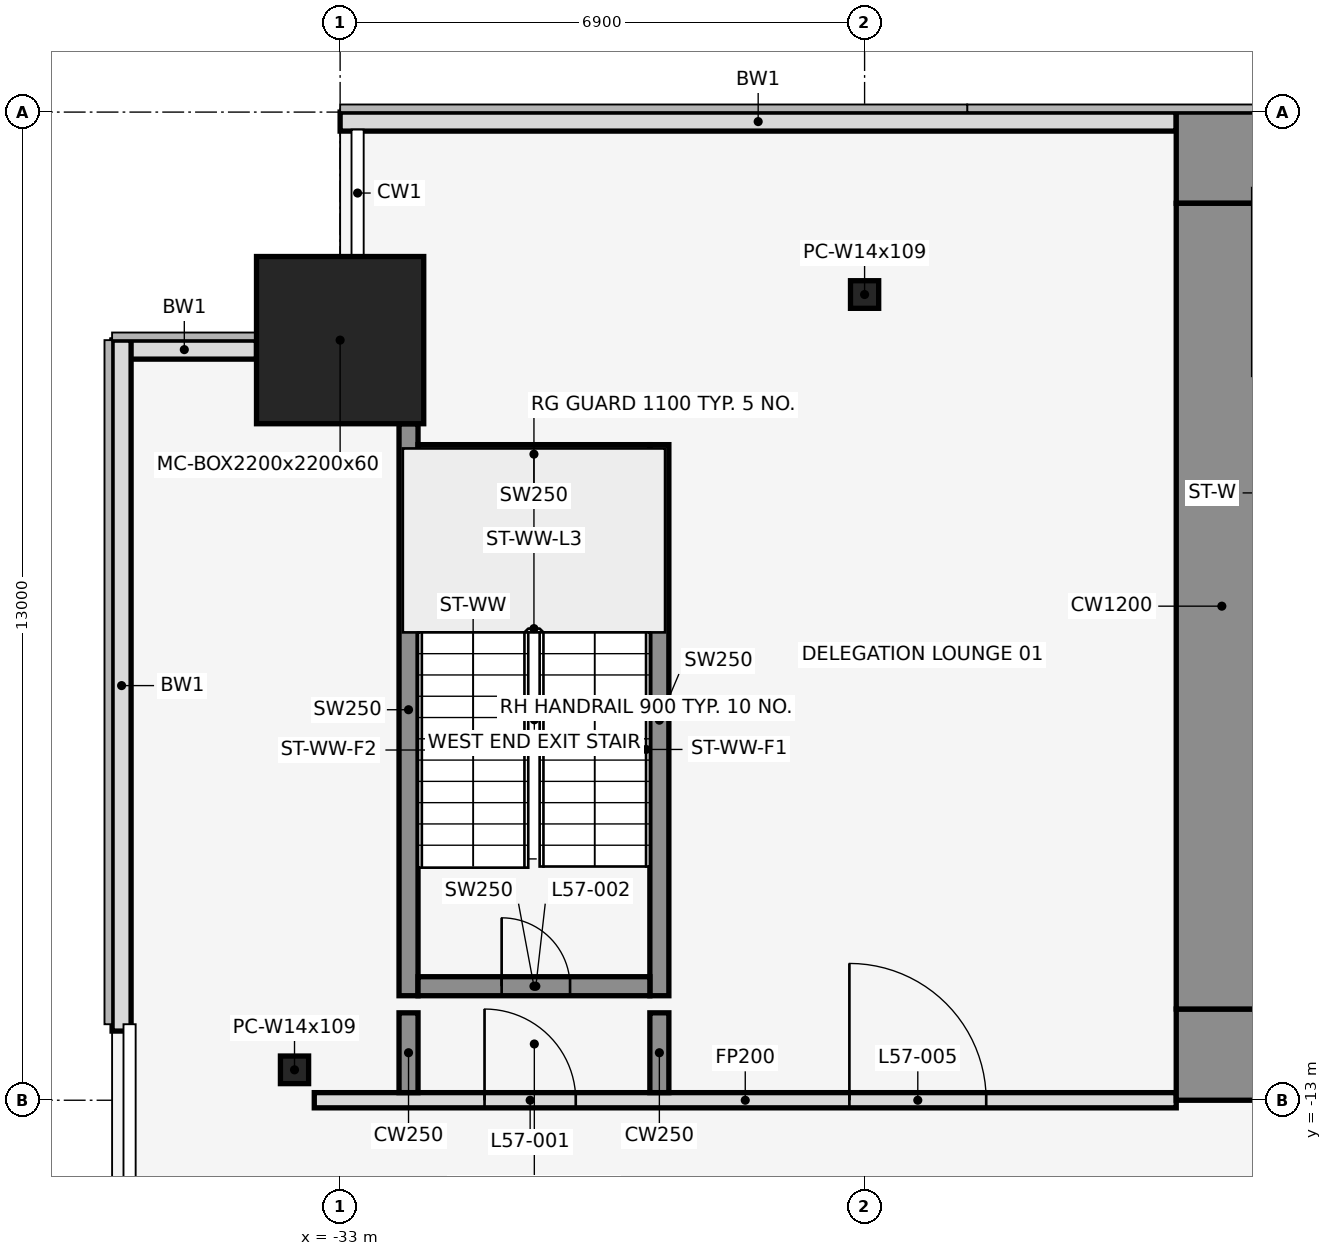
"""IFC4 building model, lengths in metres.
Left out: names, types, materials, properties, quantities, classifications, styles, units other than length and angle.
Written with IfcOpenShell. Run it as: python <this file> out.ifc"""

import sys

from ifc_helpers import new_model, si_unit, direction, frame, frame_2d, origin, origin_2d, place, context, subcontext, project, spatial, rectangle, hollow_rectangle, i_section, extrude, element, fill, save


model = new_model("IFC4")
c1 = context("Model", 3, precision=1e-05, world=origin(), true_north=direction((0.0, 1.0)))
c2 = subcontext(c1, "Body", "Model", "MODEL_VIEW")
j1 = project(units=[si_unit("LENGTHUNIT", "METRE"), si_unit("PLANEANGLEUNIT", "RADIAN")], contexts=[c1])
p1 = place(None, origin())
s1 = spatial("IfcSite", under=j1, at=p1, CompositionType="ELEMENT")
p2 = place(p1, origin())
s2 = spatial("IfcBuilding", under=s1, at=p2, CompositionType="ELEMENT")
p3 = place(p2, frame((0.0, 0.0, 254.0)))
s3 = spatial("IfcBuildingStorey", under=s2, at=p3, CompositionType="ELEMENT", Elevation=254.0)
p4 = place(p3, frame((-33.0, -3.0, 0.0), z_axis=(0.0, 0.0, 1.0), x_axis=(1.0, 0.0, 0.0)))
e1 = element("IfcColumn", 1, at=p4, inside=s3, PredefinedType="COLUMN", context=c2, shape_type="SweptSolid", body=[
    extrude(hollow_rectangle(XDim=2.2, YDim=2.2, WallThickness=0.06, at=origin_2d()), origin(), (0.0, 0.0, 1.0), 4.2),
])
for number, where, z_axis, x_axis in (
    (2, (-26.1, -2.4, 0.0), (0.0, 0.0, 1.0), (1.0, 0.0, 0.0)),
    (3, (-33.6, -12.6, 0.0), (0.0, 0.0, 1.0), (1.0, 0.0, 0.0)),
):
    element("IfcColumn", number, at=place(p3, frame(where, z_axis=z_axis, x_axis=x_axis)), inside=s3, PredefinedType="COLUMN", context=c2, shape_type="SweptSolid", body=[
        extrude(i_section(OverallWidth=0.371, OverallDepth=0.363, WebThickness=0.013, FlangeThickness=0.022, at=origin_2d()), origin(), (0.0, 0.0, 1.0), 4.2),
    ])
p5 = place(p3, frame((-22.0, -0.125, 0.0), z_axis=(0.0, 0.0, 1.0), x_axis=(-1.0, 0.0, 0.0)))
e4 = element("IfcWall", 4, at=p5, inside=s3, PredefinedType="STANDARD", context=c2, shape_type="SweptSolid", body=[
    extrude(rectangle(XDim=11.0, YDim=0.25, at=frame_2d((5.5, 0.0))), origin(), (0.0, 0.0, 1.0), 4.05),
])
p6 = place(p3, frame((-34.1, -3.125, 0.0), z_axis=(0.0, 0.0, 1.0), x_axis=(-1.0, 0.0, 0.0)))
e5 = element("IfcWall", 5, at=p6, inside=s3, PredefinedType="STANDARD", context=c2, shape_type="SweptSolid", body=[
    extrude(rectangle(XDim=1.9, YDim=0.25, at=frame_2d((0.95, 0.0))), origin(), (0.0, 0.0, 1.0), 4.05),
])
p7 = place(p3, frame((-35.875, -3.0, 0.0), z_axis=(0.0, 0.0, 1.0), x_axis=(0.0, -1.0, 0.0)))
e6 = element("IfcWall", 6, at=p7, inside=s3, PredefinedType="STANDARD", context=c2, shape_type="SweptSolid", body=[
    extrude(rectangle(XDim=9.09, YDim=0.25, at=frame_2d((4.545, 0.0))), origin(), (0.0, 0.0, 1.0), 4.05),
])
p8 = place(p3, frame((-32.1, -11.625, 0.0), z_axis=(0.0, 0.0, 1.0), x_axis=(0.0, 1.0, 0.0)))
e7 = element("IfcWall", 7, at=p8, inside=s3, PredefinedType="SHEAR", context=c2, shape_type="SweptSolid", body=[
    extrude(rectangle(XDim=7.525, YDim=0.25, at=frame_2d((3.762, 0.0))), origin(), (0.0, 0.0, 1.0), 4.2),
])
p9 = place(p3, frame((-28.8, -11.625, 0.0), z_axis=(0.0, 0.0, 1.0), x_axis=(0.0, 1.0, 0.0)))
e8 = element("IfcWall", 8, at=p9, inside=s3, PredefinedType="SHEAR", context=c2, shape_type="SweptSolid", body=[
    extrude(rectangle(XDim=7.25, YDim=0.25, at=frame_2d((3.625, 0.0))), origin(), (0.0, 0.0, 1.0), 4.2),
])
p10 = place(p3, frame((-31.975, -11.5, 0.0), z_axis=(0.0, 0.0, 1.0), x_axis=(1.0, 0.0, 0.0)))
e9 = element("IfcWall", 9, at=p10, inside=s3, PredefinedType="SHEAR", context=c2, shape_type="SweptSolid", body=[
    extrude(rectangle(XDim=3.05, YDim=0.25, at=frame_2d((1.525, 0.0))), origin(), (0.0, 0.0, 1.0), 4.2),
])
p11 = place(p10, frame((1.1, 0.0, 0.0)))
e10 = element("IfcOpeningElement", 10, at=p11, cuts=e9, PredefinedType="OPENING", context=c2, shape_type="SweptSolid", body=[
    extrude(rectangle(XDim=0.9, YDim=2.1, at=frame_2d((0.45, 1.05))), frame((0.0, 0.137, 0.0), z_axis=(0.0, -1.0, 0.0), x_axis=(1.0, 0.0, 0.0)), (0.0, 0.0, 1.0), 0.274),
])
p12 = place(p3, frame((-31.975, -4.5, 0.0), z_axis=(0.0, 0.0, 1.0), x_axis=(1.0, 0.0, 0.0)))
e11 = element("IfcWall", 11, at=p12, inside=s3, PredefinedType="SHEAR", context=c2, shape_type="SweptSolid", body=[
    extrude(rectangle(XDim=3.05, YDim=0.25, at=frame_2d((1.525, 0.0))), origin(), (0.0, 0.0, 1.0), 4.2),
])
p13 = place(p3, frame((-33.34, -13.0, 0.0), z_axis=(0.0, 0.0, 1.0), x_axis=(1.0, 0.0, 0.0)))
e12 = element("IfcWall", 12, at=p13, inside=s3, PredefinedType="PARTITIONING", context=c2, shape_type="SweptSolid", body=[
    extrude(rectangle(XDim=11.34, YDim=0.2, at=frame_2d((5.67, 0.0))), origin(), (0.0, 0.0, 1.0), 3.118),
])
p14 = place(p13, frame((2.24, 0.0, 0.0)))
e13 = element("IfcOpeningElement", 13, at=p14, cuts=e12, PredefinedType="OPENING", context=c2, shape_type="SweptSolid", body=[
    extrude(rectangle(XDim=1.2, YDim=2.1, at=frame_2d((0.6, 1.05))), frame((0.0, 0.112, 0.0), z_axis=(0.0, -1.0, 0.0), x_axis=(1.0, 0.0, 0.0)), (0.0, 0.0, 1.0), 0.224),
])
p15 = place(p13, frame((7.04, 0.0, 0.0)))
e14 = element("IfcOpeningElement", 14, at=p15, cuts=e12, PredefinedType="OPENING", context=c2, shape_type="SweptSolid", body=[
    extrude(rectangle(XDim=1.8, YDim=2.1, at=frame_2d((0.9, 1.05))), frame((0.0, 0.112, 0.0), z_axis=(0.0, -1.0, 0.0), x_axis=(1.0, 0.0, 0.0)), (0.0, 0.0, 1.0), 0.224),
])
for number, where, z_axis, x_axis in (
    (15, (-32.1, -12.9, 0.0), (0.0, 0.0, 1.0), (0.0, 1.0, 0.0)),
    (16, (-28.8, -12.9, 0.0), (0.0, 0.0, 1.0), (0.0, 1.0, 0.0)),
):
    element("IfcWall", number, at=place(p3, frame(where, z_axis=z_axis, x_axis=x_axis)), inside=s3, PredefinedType="SHEAR", context=c2, shape_type="SweptSolid", body=[
        extrude(rectangle(XDim=1.05, YDim=0.25, at=frame_2d((0.525, 0.0))), origin(), (0.0, 0.0, 1.0), 4.2),
    ])
p16 = place(p3, frame((-22.0, -0.6, 0.0), z_axis=(0.0, 0.0, 1.0), x_axis=(1.0, 0.0, 0.0)))
e17 = element("IfcWall", 17, at=p16, inside=s3, PredefinedType="SHEAR", context=c2, shape_type="SweptSolid", body=[
    extrude(rectangle(XDim=44.0, YDim=1.2, at=frame_2d((22.0, 0.0))), origin(), (0.0, 0.0, 1.0), 4.2),
])
p17 = place(p16, frame((18.55, 0.0, 0.0)))
e18 = element("IfcOpeningElement", 18, at=p17, cuts=e17, PredefinedType="OPENING", context=c2, shape_type="SweptSolid", body=[
    extrude(rectangle(XDim=0.9, YDim=2.1, at=frame_2d((0.45, 1.05))), frame((0.0, 0.612, 0.0), z_axis=(0.0, -1.0, 0.0), x_axis=(1.0, 0.0, 0.0)), (0.0, 0.0, 1.0), 1.224),
])
p18 = place(p16, frame((24.55, 0.0, 0.0)))
e19 = element("IfcOpeningElement", 19, at=p18, cuts=e17, PredefinedType="OPENING", context=c2, shape_type="SweptSolid", body=[
    extrude(rectangle(XDim=0.9, YDim=2.1, at=frame_2d((0.45, 1.05))), frame((0.0, 0.612, 0.0), z_axis=(0.0, -1.0, 0.0), x_axis=(1.0, 0.0, 0.0)), (0.0, 0.0, 1.0), 1.224),
])
p19 = place(p3, frame((-22.0, -12.4, 0.0), z_axis=(0.0, 0.0, 1.0), x_axis=(1.0, 0.0, 0.0)))
e20 = element("IfcWall", 20, at=p19, inside=s3, PredefinedType="SHEAR", context=c2, shape_type="SweptSolid", body=[
    extrude(rectangle(XDim=44.0, YDim=1.2, at=frame_2d((22.0, 0.0))), origin(), (0.0, 0.0, 1.0), 4.2),
])
p20 = place(p19, frame((2.2, 0.0, 0.0)))
e21 = element("IfcOpeningElement", 21, at=p20, cuts=e20, PredefinedType="OPENING", context=c2, shape_type="SweptSolid", body=[
    extrude(rectangle(XDim=1.2, YDim=2.1, at=frame_2d((0.6, 1.05))), frame((0.0, 0.612, 0.0), z_axis=(0.0, -1.0, 0.0), x_axis=(1.0, 0.0, 0.0)), (0.0, 0.0, 1.0), 1.224),
])
p21 = place(p19, frame((21.4, 0.0, 0.0)))
e22 = element("IfcOpeningElement", 22, at=p21, cuts=e20, PredefinedType="OPENING", context=c2, shape_type="SweptSolid", body=[
    extrude(rectangle(XDim=1.2, YDim=2.1, at=frame_2d((0.6, 1.05))), frame((0.0, 0.612, 0.0), z_axis=(0.0, -1.0, 0.0), x_axis=(1.0, 0.0, 0.0)), (0.0, 0.0, 1.0), 1.224),
])
p22 = place(p19, frame((40.6, 0.0, 0.0)))
e23 = element("IfcOpeningElement", 23, at=p22, cuts=e20, PredefinedType="OPENING", context=c2, shape_type="SweptSolid", body=[
    extrude(rectangle(XDim=1.2, YDim=2.1, at=frame_2d((0.6, 1.05))), frame((0.0, 0.612, 0.0), z_axis=(0.0, -1.0, 0.0), x_axis=(1.0, 0.0, 0.0)), (0.0, 0.0, 1.0), 1.224),
])
p23 = place(p19, frame((16.0, 0.0, 0.0)))
e24 = element("IfcOpeningElement", 24, at=p23, cuts=e20, PredefinedType="OPENING", context=c2, shape_type="SweptSolid", body=[
    extrude(rectangle(XDim=1.8, YDim=2.1, at=frame_2d((0.9, 1.05))), frame((0.0, 0.612, 0.0), z_axis=(0.0, -1.0, 0.0), x_axis=(1.0, 0.0, 0.0)), (0.0, 0.0, 1.0), 1.224),
])
p24 = place(p19, frame((6.3, 0.0, 0.0)))
e25 = element("IfcOpeningElement", 25, at=p24, cuts=e20, PredefinedType="OPENING", context=c2, shape_type="SweptSolid", body=[
    extrude(rectangle(XDim=1.2, YDim=2.1, at=frame_2d((0.6, 1.05))), frame((0.0, 0.612, 0.0), z_axis=(0.0, -1.0, 0.0), x_axis=(1.0, 0.0, 0.0)), (0.0, 0.0, 1.0), 1.224),
])
p25 = place(p19, frame((26.2, 0.0, 0.0)))
e26 = element("IfcOpeningElement", 26, at=p25, cuts=e20, PredefinedType="OPENING", context=c2, shape_type="SweptSolid", body=[
    extrude(rectangle(XDim=1.8, YDim=2.1, at=frame_2d((0.9, 1.05))), frame((0.0, 0.612, 0.0), z_axis=(0.0, -1.0, 0.0), x_axis=(1.0, 0.0, 0.0)), (0.0, 0.0, 1.0), 1.224),
])
p26 = place(p19, frame((36.5, 0.0, 0.0)))
e27 = element("IfcOpeningElement", 27, at=p26, cuts=e20, PredefinedType="OPENING", context=c2, shape_type="SweptSolid", body=[
    extrude(rectangle(XDim=1.2, YDim=2.1, at=frame_2d((0.6, 1.05))), frame((0.0, 0.612, 0.0), z_axis=(0.0, -1.0, 0.0), x_axis=(1.0, 0.0, 0.0)), (0.0, 0.0, 1.0), 1.224),
])
p27 = place(p3, frame((-21.4, -11.8, 0.0), z_axis=(0.0, 0.0, 1.0), x_axis=(0.0, 1.0, 0.0)))
e28 = element("IfcWall", 28, at=p27, inside=s3, PredefinedType="SHEAR", context=c2, shape_type="SweptSolid", body=[
    extrude(rectangle(XDim=10.6, YDim=1.2, at=frame_2d((5.3, 0.0))), origin(), (0.0, 0.0, 1.0), 4.2),
])
p28 = place(p14, origin())
e29 = element("IfcDoor", 29, at=p28, inside=s3, OperationType="SINGLE_SWING_LEFT", PredefinedType="DOOR", context=c2, shape_type="SweptSolid", body=[
    extrude(rectangle(XDim=1.2, YDim=2.1, at=frame_2d((0.6, 1.05))), frame((0.0, 0.025, 0.0), z_axis=(0.0, -1.0, 0.0), x_axis=(1.0, 0.0, 0.0)), (0.0, 0.0, 1.0), 0.05),
])
fill(e13, e29)
p29 = place(p11, origin())
e30 = element("IfcDoor", 30, at=p29, inside=s3, OperationType="SINGLE_SWING_LEFT", PredefinedType="DOOR", context=c2, shape_type="SweptSolid", body=[
    extrude(rectangle(XDim=0.9, YDim=2.1, at=frame_2d((0.45, 1.05))), frame((0.0, 0.025, 0.0), z_axis=(0.0, -1.0, 0.0), x_axis=(1.0, 0.0, 0.0)), (0.0, 0.0, 1.0), 0.05),
])
fill(e10, e30)
p30 = place(p15, origin())
e31 = element("IfcDoor", 31, at=p30, inside=s3, OperationType="SINGLE_SWING_LEFT", PredefinedType="DOOR", context=c2, shape_type="SweptSolid", body=[
    extrude(rectangle(XDim=1.8, YDim=2.1, at=frame_2d((0.9, 1.05))), frame((0.0, 0.025, 0.0), z_axis=(0.0, -1.0, 0.0), x_axis=(1.0, 0.0, 0.0)), (0.0, 0.0, 1.0), 0.05),
])
fill(e14, e31)
save(model, sys.argv[1])
